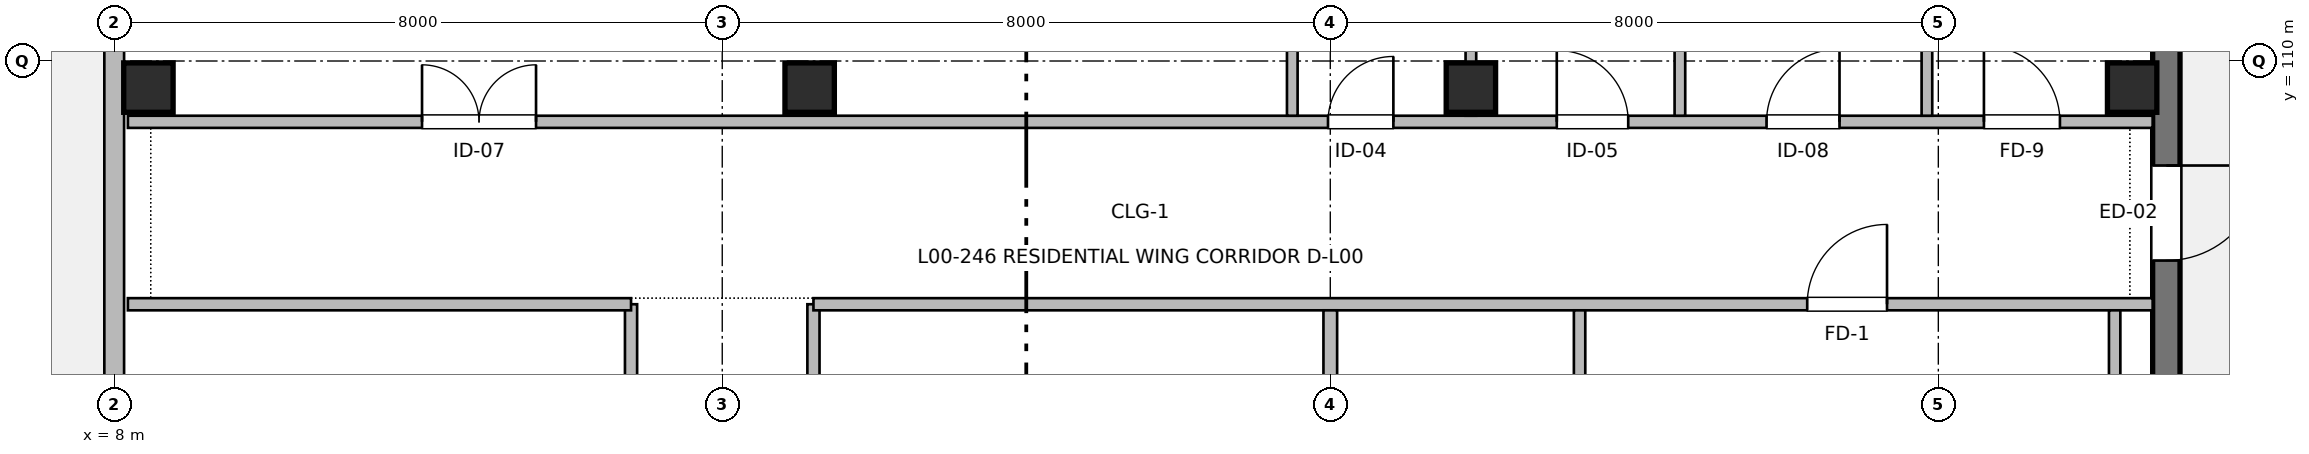
"""IFC4 building model, lengths in metres.
Left out: names, types, materials, properties, quantities, classifications, styles, units other than length and angle.
Written with IfcOpenShell. Run it as: python <this file> out.ifc"""

import sys

from ifc_helpers import new_model, si_unit, direction, frame, frame_2d, origin, origin_2d, place, context, subcontext, project, spatial, rectangle, extrude, element, fill, save


model = new_model("IFC4")
c1 = context("Model", 3, precision=1e-05, world=origin(), true_north=direction((0.0, 1.0)))
c2 = subcontext(c1, "Body", "Model", "MODEL_VIEW")
j1 = project(units=[si_unit("LENGTHUNIT", "METRE"), si_unit("PLANEANGLEUNIT", "RADIAN")], contexts=[c1])
p1 = place(None, origin())
s1 = spatial("IfcSite", under=j1, at=p1, CompositionType="ELEMENT")
p2 = place(p1, origin())
s2 = spatial("IfcBuilding", under=s1, at=p2, CompositionType="ELEMENT")
p3 = place(p2, origin())
s3 = spatial("IfcBuildingStorey", under=s2, at=p3, CompositionType="ELEMENT", Elevation=0.0)
for number, where, z_axis, x_axis in (
    (1, (8.45, 109.65, 0.0), (0.0, 0.0, 1.0), (1.0, 0.0, 0.0)),
    (2, (17.15, 109.65, 0.0), (0.0, 0.0, 1.0), (1.0, 0.0, 0.0)),
    (3, (25.85, 109.65, 0.0), (0.0, 0.0, 1.0), (1.0, 0.0, 0.0)),
    (4, (34.55, 109.65, 0.0), (0.0, 0.0, 1.0), (1.0, 0.0, 0.0)),
):
    element("IfcColumn", number, at=place(p3, frame(where, z_axis=z_axis, x_axis=x_axis)), inside=s3, PredefinedType="COLUMN", context=c2, shape_type="SweptSolid", body=[
        extrude(rectangle(XDim=0.65, YDim=0.65, at=origin_2d()), origin(), (0.0, 0.0, 1.0), 4.16),
    ])
p4 = place(p3, frame((35.0, 116.0, 0.0), z_axis=(0.0, 0.0, 1.0), x_axis=(0.0, -1.0, 0.0)))
e5 = element("IfcWall", 5, at=p4, inside=s3, PredefinedType="SHEAR", context=c2, shape_type="SweptSolid", body=[
    extrude(rectangle(XDim=16.0, YDim=0.36, at=frame_2d((8.0, 0.0))), origin(), (0.0, 0.0, 1.0), 3.94),
])
p5 = place(p4, frame((7.375, 0.0, 0.0)))
e6 = element("IfcOpeningElement", 6, at=p5, cuts=e5, PredefinedType="OPENING", context=c2, shape_type="SweptSolid", body=[
    extrude(rectangle(XDim=1.25, YDim=2.2, at=frame_2d((0.625, 1.1))), frame((0.0, 0.19, 0.0), z_axis=(0.0, -1.0, 0.0), x_axis=(1.0, 0.0, 0.0)), (0.0, 0.0, 1.0), 0.38),
])
p6 = place(p4, frame((11.325, 0.0, 0.95)))
e7 = element("IfcOpeningElement", 7, at=p6, cuts=e5, PredefinedType="OPENING", context=c2, shape_type="SweptSolid", body=[
    extrude(rectangle(XDim=1.35, YDim=1.3, at=frame_2d((0.675, 0.65))), frame((0.0, 0.19, 0.0), z_axis=(0.0, -1.0, 0.0), x_axis=(1.0, 0.0, 0.0)), (0.0, 0.0, 1.0), 0.38),
])
p7 = place(p3, frame((8.0, 56.0, 0.0), z_axis=(0.0, 0.0, 1.0), x_axis=(0.0, 1.0, 0.0)))
e8 = element("IfcWall", 8, at=p7, inside=s3, PredefinedType="SOLIDWALL", context=c2, shape_type="SweptSolid", body=[
    extrude(rectangle(XDim=60.0, YDim=0.26, at=frame_2d((30.0, 0.0))), origin(), (0.0, 0.0, 1.0), 3.94),
])
p8 = place(p7, frame((3.211, 0.0, 0.95)))
e9 = element("IfcOpeningElement", 9, at=p8, cuts=e8, PredefinedType="OPENING", context=c2, shape_type="SweptSolid", body=[
    extrude(rectangle(XDim=2.15, YDim=1.8, at=frame_2d((1.075, 0.9))), frame((0.0, 0.14, 0.0), z_axis=(0.0, -1.0, 0.0), x_axis=(1.0, 0.0, 0.0)), (0.0, 0.0, 1.0), 0.28),
])
p9 = place(p7, frame((12.182, 0.0, 0.95)))
e10 = element("IfcOpeningElement", 10, at=p9, cuts=e8, PredefinedType="OPENING", context=c2, shape_type="SweptSolid", body=[
    extrude(rectangle(XDim=1.35, YDim=1.3, at=frame_2d((0.675, 0.65))), frame((0.0, 0.14, 0.0), z_axis=(0.0, -1.0, 0.0), x_axis=(1.0, 0.0, 0.0)), (0.0, 0.0, 1.0), 0.28),
])
p10 = place(p7, frame((19.054, 0.0, 0.95)))
e11 = element("IfcOpeningElement", 11, at=p10, cuts=e8, PredefinedType="OPENING", context=c2, shape_type="SweptSolid", body=[
    extrude(rectangle(XDim=2.15, YDim=1.8, at=frame_2d((1.075, 0.9))), frame((0.0, 0.14, 0.0), z_axis=(0.0, -1.0, 0.0), x_axis=(1.0, 0.0, 0.0)), (0.0, 0.0, 1.0), 0.28),
])
p11 = place(p7, frame((29.325, 0.0, 0.95)))
e12 = element("IfcOpeningElement", 12, at=p11, cuts=e8, PredefinedType="OPENING", context=c2, shape_type="SweptSolid", body=[
    extrude(rectangle(XDim=1.35, YDim=1.3, at=frame_2d((0.675, 0.65))), frame((0.0, 0.14, 0.0), z_axis=(0.0, -1.0, 0.0), x_axis=(1.0, 0.0, 0.0)), (0.0, 0.0, 1.0), 0.28),
])
p12 = place(p7, frame((37.496, 0.0, 0.95)))
e13 = element("IfcOpeningElement", 13, at=p12, cuts=e8, PredefinedType="OPENING", context=c2, shape_type="SweptSolid", body=[
    extrude(rectangle(XDim=2.15, YDim=1.8, at=frame_2d((1.075, 0.9))), frame((0.0, 0.14, 0.0), z_axis=(0.0, -1.0, 0.0), x_axis=(1.0, 0.0, 0.0)), (0.0, 0.0, 1.0), 0.28),
])
p13 = place(p7, frame((46.468, 0.0, 0.95)))
e14 = element("IfcOpeningElement", 14, at=p13, cuts=e8, PredefinedType="OPENING", context=c2, shape_type="SweptSolid", body=[
    extrude(rectangle(XDim=1.35, YDim=1.3, at=frame_2d((0.675, 0.65))), frame((0.0, 0.14, 0.0), z_axis=(0.0, -1.0, 0.0), x_axis=(1.0, 0.0, 0.0)), (0.0, 0.0, 1.0), 0.28),
])
p14 = place(p7, frame((54.639, 0.0, 0.95)))
e15 = element("IfcOpeningElement", 15, at=p14, cuts=e8, PredefinedType="OPENING", context=c2, shape_type="SweptSolid", body=[
    extrude(rectangle(XDim=2.15, YDim=1.8, at=frame_2d((1.075, 0.9))), frame((0.0, 0.14, 0.0), z_axis=(0.0, -1.0, 0.0), x_axis=(1.0, 0.0, 0.0)), (0.0, 0.0, 1.0), 0.28),
])
p15 = place(p3, frame((14.8, 56.18, 0.0), z_axis=(0.0, 0.0, 1.0), x_axis=(0.0, 1.0, 0.0)))
e16 = element("IfcWall", 16, at=p15, inside=s3, PredefinedType="PARTITIONING", context=c2, shape_type="SweptSolid", body=[
    extrude(rectangle(XDim=50.62, YDim=0.16, at=frame_2d((25.31, 0.0))), origin(), (0.0, 0.0, 1.0), 3.895),
])
p16 = place(p15, frame((12.82, 0.0, 0.0)))
e17 = element("IfcOpeningElement", 17, at=p16, cuts=e16, PredefinedType="OPENING", context=c2, shape_type="SweptSolid", body=[
    extrude(rectangle(XDim=1.1, YDim=2.15, at=frame_2d((0.55, 1.075))), frame((0.0, 0.09, 0.0), z_axis=(0.0, -1.0, 0.0), x_axis=(1.0, 0.0, 0.0)), (0.0, 0.0, 1.0), 0.18),
])
p17 = place(p15, frame((19.22, 0.0, 0.0)))
e18 = element("IfcOpeningElement", 18, at=p17, cuts=e16, PredefinedType="OPENING", context=c2, shape_type="SweptSolid", body=[
    extrude(rectangle(XDim=1.6, YDim=2.15, at=frame_2d((0.8, 1.075))), frame((0.0, 0.09, 0.0), z_axis=(0.0, -1.0, 0.0), x_axis=(1.0, 0.0, 0.0)), (0.0, 0.0, 1.0), 0.18),
])
p18 = place(p15, frame((3.5, 0.0, 0.0)))
e19 = element("IfcOpeningElement", 19, at=p18, cuts=e16, PredefinedType="OPENING", context=c2, shape_type="SweptSolid", body=[
    extrude(rectangle(XDim=1.05, YDim=2.15, at=frame_2d((0.525, 1.075))), frame((0.0, 0.09, 0.0), z_axis=(0.0, -1.0, 0.0), x_axis=(1.0, 0.0, 0.0)), (0.0, 0.0, 1.0), 0.18),
])
p19 = place(p15, frame((29.2, 0.0, 0.0)))
e20 = element("IfcOpeningElement", 20, at=p19, cuts=e16, PredefinedType="OPENING", context=c2, shape_type="SweptSolid", body=[
    extrude(rectangle(XDim=1.55, YDim=2.2, at=frame_2d((0.775, 1.1))), frame((0.0, 0.09, 0.0), z_axis=(0.0, -1.0, 0.0), x_axis=(1.0, 0.0, 0.0)), (0.0, 0.0, 1.0), 0.18),
])
p20 = place(p3, frame((17.2, 56.18, 0.0), z_axis=(0.0, 0.0, 1.0), x_axis=(0.0, 1.0, 0.0)))
e21 = element("IfcWall", 21, at=p20, inside=s3, PredefinedType="PARTITIONING", context=c2, shape_type="SweptSolid", body=[
    extrude(rectangle(XDim=50.62, YDim=0.16, at=frame_2d((25.31, 0.0))), origin(), (0.0, 0.0, 1.0), 3.895),
])
p21 = place(p20, frame((2.515, 0.0, 0.0)))
e22 = element("IfcOpeningElement", 22, at=p21, cuts=e21, PredefinedType="OPENING", context=c2, shape_type="SweptSolid", body=[
    extrude(rectangle(XDim=1.0, YDim=2.1, at=frame_2d((0.5, 1.05))), frame((0.0, 0.09, 0.0), z_axis=(0.0, -1.0, 0.0), x_axis=(1.0, 0.0, 0.0)), (0.0, 0.0, 1.0), 0.18),
])
p22 = place(p20, frame((8.92, 0.0, 0.0)))
e23 = element("IfcOpeningElement", 23, at=p22, cuts=e21, PredefinedType="OPENING", context=c2, shape_type="SweptSolid", body=[
    extrude(rectangle(XDim=1.0, YDim=2.1, at=frame_2d((0.5, 1.05))), frame((0.0, 0.09, 0.0), z_axis=(0.0, -1.0, 0.0), x_axis=(1.0, 0.0, 0.0)), (0.0, 0.0, 1.0), 0.18),
])
p23 = place(p20, frame((15.42, 0.0, 0.0)))
e24 = element("IfcOpeningElement", 24, at=p23, cuts=e21, PredefinedType="OPENING", context=c2, shape_type="SweptSolid", body=[
    extrude(rectangle(XDim=1.0, YDim=2.1, at=frame_2d((0.5, 1.05))), frame((0.0, 0.09, 0.0), z_axis=(0.0, -1.0, 0.0), x_axis=(1.0, 0.0, 0.0)), (0.0, 0.0, 1.0), 0.18),
])
p24 = place(p20, frame((24.42, 0.0, 0.0)))
e25 = element("IfcOpeningElement", 25, at=p24, cuts=e21, PredefinedType="OPENING", context=c2, shape_type="SweptSolid", body=[
    extrude(rectangle(XDim=0.96, YDim=2.15, at=frame_2d((0.48, 1.075))), frame((0.0, 0.09, 0.0), z_axis=(0.0, -1.0, 0.0), x_axis=(1.0, 0.0, 0.0)), (0.0, 0.0, 1.0), 0.18),
])
p25 = place(p20, frame((40.175, 0.0, 0.0)))
e26 = element("IfcOpeningElement", 26, at=p25, cuts=e21, PredefinedType="OPENING", context=c2, shape_type="SweptSolid", body=[
    extrude(rectangle(XDim=1.04, YDim=2.15, at=frame_2d((0.52, 1.075))), frame((0.0, 0.09, 0.0), z_axis=(0.0, -1.0, 0.0), x_axis=(1.0, 0.0, 0.0)), (0.0, 0.0, 1.0), 0.18),
])
p26 = place(p3, frame((8.18, 106.8, 0.0), z_axis=(0.0, 0.0, 1.0), x_axis=(1.0, 0.0, 0.0)))
e27 = element("IfcWall", 27, at=p26, inside=s3, PredefinedType="PARTITIONING", context=c2, shape_type="SweptSolid", body=[
    extrude(rectangle(XDim=6.62, YDim=0.16, at=frame_2d((3.31, 0.0))), origin(), (0.0, 0.0, 1.0), 3.895),
])
p27 = place(p3, frame((17.2, 106.8, 0.0), z_axis=(0.0, 0.0, 1.0), x_axis=(1.0, 0.0, 0.0)))
e28 = element("IfcWall", 28, at=p27, inside=s3, PredefinedType="PARTITIONING", context=c2, shape_type="SweptSolid", body=[
    extrude(rectangle(XDim=17.62, YDim=0.16, at=frame_2d((8.81, 0.0))), origin(), (0.0, 0.0, 1.0), 3.895),
])
p28 = place(p27, frame((13.075, 0.0, 0.0)))
e29 = element("IfcOpeningElement", 29, at=p28, cuts=e28, PredefinedType="OPENING", context=c2, shape_type="SweptSolid", body=[
    extrude(rectangle(XDim=1.05, YDim=2.15, at=frame_2d((0.525, 1.075))), frame((0.0, 0.09, 0.0), z_axis=(0.0, -1.0, 0.0), x_axis=(1.0, 0.0, 0.0)), (0.0, 0.0, 1.0), 0.18),
])
p29 = place(p3, frame((8.18, 109.2, 0.0), z_axis=(0.0, 0.0, 1.0), x_axis=(1.0, 0.0, 0.0)))
e30 = element("IfcWall", 30, at=p29, inside=s3, PredefinedType="PARTITIONING", context=c2, shape_type="SweptSolid", body=[
    extrude(rectangle(XDim=26.64, YDim=0.16, at=frame_2d((13.32, 0.0))), origin(), (0.0, 0.0, 1.0), 3.895),
])
p30 = place(p29, frame((3.87, 0.0, 0.0)))
e31 = element("IfcOpeningElement", 31, at=p30, cuts=e30, PredefinedType="OPENING", context=c2, shape_type="SweptSolid", body=[
    extrude(rectangle(XDim=1.5, YDim=2.2, at=frame_2d((0.75, 1.1))), frame((0.0, 0.09, 0.0), z_axis=(0.0, -1.0, 0.0), x_axis=(1.0, 0.0, 0.0)), (0.0, 0.0, 1.0), 0.18),
])
p31 = place(p29, frame((15.79, 0.0, 0.0)))
e32 = element("IfcOpeningElement", 32, at=p31, cuts=e30, PredefinedType="OPENING", context=c2, shape_type="SweptSolid", body=[
    extrude(rectangle(XDim=0.86, YDim=2.1, at=frame_2d((0.43, 1.05))), frame((0.0, 0.09, 0.0), z_axis=(0.0, -1.0, 0.0), x_axis=(1.0, 0.0, 0.0)), (0.0, 0.0, 1.0), 0.18),
])
p32 = place(p29, frame((18.8, 0.0, 0.0)))
e33 = element("IfcOpeningElement", 33, at=p32, cuts=e30, PredefinedType="OPENING", context=c2, shape_type="SweptSolid", body=[
    extrude(rectangle(XDim=0.94, YDim=2.1, at=frame_2d((0.47, 1.05))), frame((0.0, 0.09, 0.0), z_axis=(0.0, -1.0, 0.0), x_axis=(1.0, 0.0, 0.0)), (0.0, 0.0, 1.0), 0.18),
])
p33 = place(p29, frame((21.56, 0.0, 0.0)))
e34 = element("IfcOpeningElement", 34, at=p33, cuts=e30, PredefinedType="OPENING", context=c2, shape_type="SweptSolid", body=[
    extrude(rectangle(XDim=0.96, YDim=2.15, at=frame_2d((0.48, 1.075))), frame((0.0, 0.09, 0.0), z_axis=(0.0, -1.0, 0.0), x_axis=(1.0, 0.0, 0.0)), (0.0, 0.0, 1.0), 0.18),
])
p34 = place(p29, frame((24.42, 0.0, 0.0)))
e35 = element("IfcOpeningElement", 35, at=p34, cuts=e30, PredefinedType="OPENING", context=c2, shape_type="SweptSolid", body=[
    extrude(rectangle(XDim=1.0, YDim=2.1, at=frame_2d((0.5, 1.05))), frame((0.0, 0.09, 0.0), z_axis=(0.0, -1.0, 0.0), x_axis=(1.0, 0.0, 0.0)), (0.0, 0.0, 1.0), 0.18),
])
p35 = place(p3, frame((24.0, 100.05, 0.0), z_axis=(0.0, 0.0, 1.0), x_axis=(0.0, 1.0, 0.0)))
e36 = element("IfcWall", 36, at=p35, inside=s3, PredefinedType="PARTITIONING", context=c2, shape_type="SweptSolid", body=[
    extrude(rectangle(XDim=6.67, YDim=0.18, at=frame_2d((3.335, 0.0))), origin(), (0.0, 0.0, 1.0), 3.895),
])
for number, where, z_axis, x_axis in (
    (37, (27.28, 103.99, 0.0), (0.0, 0.0, 1.0), (0.0, 1.0, 0.0)),
    (38, (34.32, 103.99, 0.0), (0.0, 0.0, 1.0), (0.0, 1.0, 0.0)),
):
    element("IfcWall", number, at=place(p3, frame(where, z_axis=z_axis, x_axis=x_axis)), inside=s3, PredefinedType="PARTITIONING", context=c2, shape_type="SweptSolid", body=[
        extrude(rectangle(XDim=2.73, YDim=0.15, at=frame_2d((1.365, 0.0))), origin(), (0.0, 0.0, 1.0), 3.895),
    ])
p36 = place(p3, frame((23.5, 109.28, 0.0), z_axis=(0.0, 0.0, 1.0), x_axis=(0.0, 1.0, 0.0)))
e39 = element("IfcWall", 39, at=p36, inside=s3, PredefinedType="PARTITIONING", context=c2, shape_type="SweptSolid", body=[
    extrude(rectangle(XDim=6.59, YDim=0.14, at=frame_2d((3.295, 0.0))), origin(), (0.0, 0.0, 1.0), 3.895),
])
p37 = place(p3, frame((25.85, 109.28, 0.0), z_axis=(0.0, 0.0, 1.0), x_axis=(0.0, 1.0, 0.0)))
e40 = element("IfcWall", 40, at=p37, inside=s3, PredefinedType="PARTITIONING", context=c2, shape_type="SweptSolid", body=[
    extrude(rectangle(XDim=6.59, YDim=0.14, at=frame_2d((3.295, 0.0))), origin(), (0.0, 0.0, 1.0), 3.64),
])
for number, where, z_axis, x_axis in (
    (41, (28.6, 109.28, 0.0), (0.0, 0.0, 1.0), (0.0, 1.0, 0.0)),
    (42, (31.85, 109.28, 0.0), (0.0, 0.0, 1.0), (0.0, 1.0, 0.0)),
):
    element("IfcWall", number, at=place(p3, frame(where, z_axis=z_axis, x_axis=x_axis)), inside=s3, PredefinedType="PARTITIONING", context=c2, shape_type="SweptSolid", body=[
        extrude(rectangle(XDim=6.59, YDim=0.14, at=frame_2d((3.295, 0.0))), origin(), (0.0, 0.0, 1.0), 3.895),
    ])
p38 = place(p5, origin())
e43 = element("IfcDoor", 43, at=p38, inside=s3, OperationType="SINGLE_SWING_LEFT", PredefinedType="DOOR", context=c2, shape_type="SweptSolid", body=[
    extrude(rectangle(XDim=1.25, YDim=2.2, at=frame_2d((0.625, 1.1))), frame((0.0, 0.025, 0.0), z_axis=(0.0, -1.0, 0.0), x_axis=(1.0, 0.0, 0.0)), (0.0, 0.0, 1.0), 0.05),
])
fill(e6, e43)
p39 = place(p28, origin())
e44 = element("IfcDoor", 44, at=p39, inside=s3, OperationType="SINGLE_SWING_RIGHT", PredefinedType="DOOR", context=c2, shape_type="SweptSolid", body=[
    extrude(rectangle(XDim=1.05, YDim=2.15, at=frame_2d((0.525, 1.075))), frame((0.0, 0.025, 0.0), z_axis=(0.0, -1.0, 0.0), x_axis=(1.0, 0.0, 0.0)), (0.0, 0.0, 1.0), 0.05),
])
fill(e29, e44)
p40 = place(p30, origin())
e45 = element("IfcDoor", 45, at=p40, inside=s3, OperationType="DOUBLE_DOOR_SINGLE_SWING", PredefinedType="DOOR", context=c2, shape_type="SweptSolid", body=[
    extrude(rectangle(XDim=1.5, YDim=2.2, at=frame_2d((0.75, 1.1))), frame((0.0, 0.025, 0.0), z_axis=(0.0, -1.0, 0.0), x_axis=(1.0, 0.0, 0.0)), (0.0, 0.0, 1.0), 0.05),
])
fill(e31, e45)
p41 = place(p31, origin())
e46 = element("IfcDoor", 46, at=p41, inside=s3, OperationType="SINGLE_SWING_RIGHT", PredefinedType="DOOR", context=c2, shape_type="SweptSolid", body=[
    extrude(rectangle(XDim=0.86, YDim=2.1, at=frame_2d((0.43, 1.05))), frame((0.0, 0.025, 0.0), z_axis=(0.0, -1.0, 0.0), x_axis=(1.0, 0.0, 0.0)), (0.0, 0.0, 1.0), 0.05),
])
fill(e32, e46)
p42 = place(p32, origin())
e47 = element("IfcDoor", 47, at=p42, inside=s3, OperationType="SINGLE_SWING_LEFT", PredefinedType="DOOR", context=c2, shape_type="SweptSolid", body=[
    extrude(rectangle(XDim=0.94, YDim=2.1, at=frame_2d((0.47, 1.05))), frame((0.0, 0.025, 0.0), z_axis=(0.0, -1.0, 0.0), x_axis=(1.0, 0.0, 0.0)), (0.0, 0.0, 1.0), 0.05),
])
fill(e33, e47)
p43 = place(p33, origin())
e48 = element("IfcDoor", 48, at=p43, inside=s3, OperationType="SINGLE_SWING_RIGHT", PredefinedType="DOOR", context=c2, shape_type="SweptSolid", body=[
    extrude(rectangle(XDim=0.96, YDim=2.15, at=frame_2d((0.48, 1.075))), frame((0.0, 0.025, 0.0), z_axis=(0.0, -1.0, 0.0), x_axis=(1.0, 0.0, 0.0)), (0.0, 0.0, 1.0), 0.05),
])
fill(e34, e48)
p44 = place(p34, origin())
e49 = element("IfcDoor", 49, at=p44, inside=s3, OperationType="SINGLE_SWING_LEFT", PredefinedType="DOOR", context=c2, shape_type="SweptSolid", body=[
    extrude(rectangle(XDim=1.0, YDim=2.1, at=frame_2d((0.5, 1.05))), frame((0.0, 0.025, 0.0), z_axis=(0.0, -1.0, 0.0), x_axis=(1.0, 0.0, 0.0)), (0.0, 0.0, 1.0), 0.05),
])
fill(e35, e49)
save(model, sys.argv[1])
